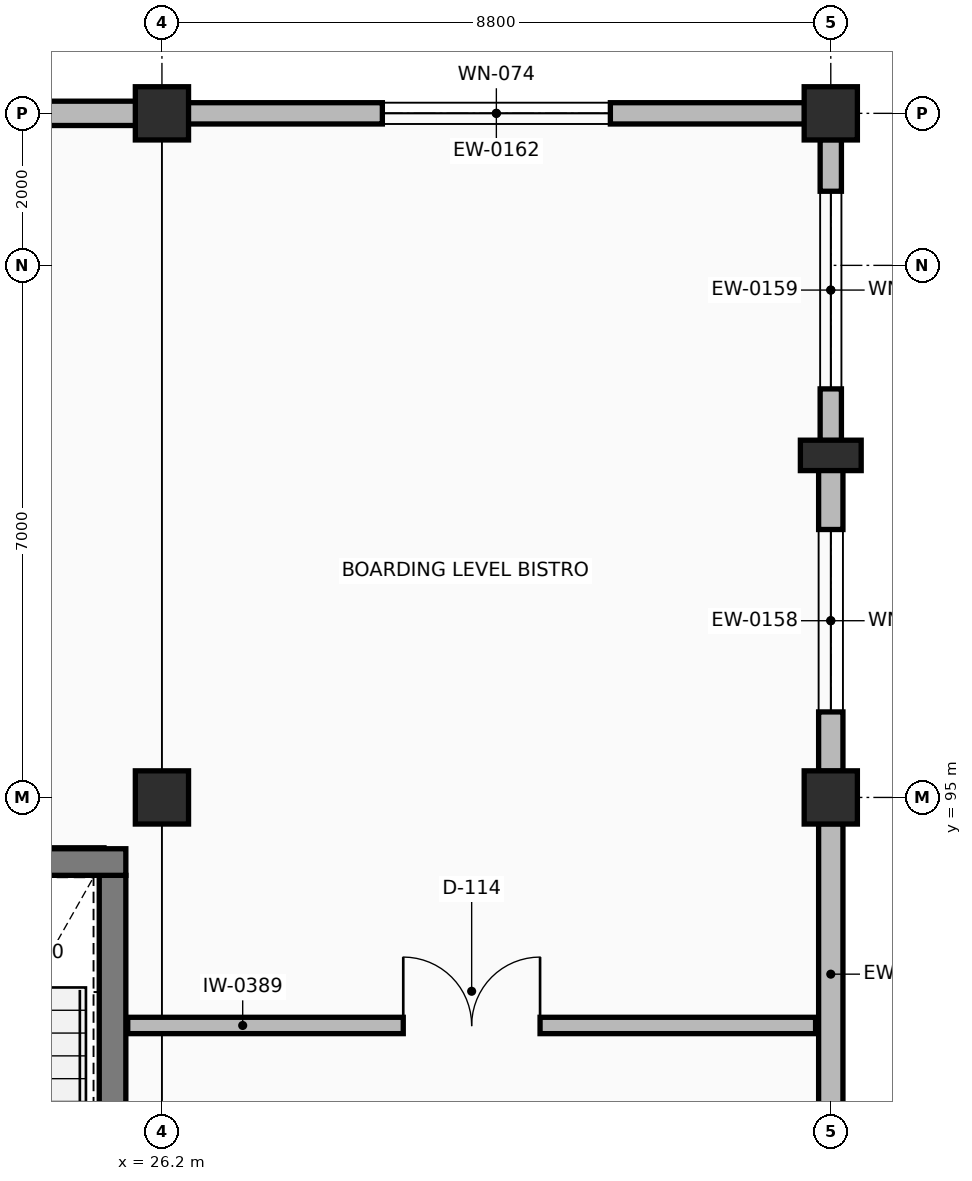
"""IFC4 building model, lengths in metres.
Left out: names, types, materials, properties, quantities, classifications, styles, units other than length and angle.
Written with IfcOpenShell. Run it as: python <this file> out.ifc"""

import sys

from ifc_helpers import new_model, si_unit, direction, frame, frame_2d, origin, origin_2d, place, context, subcontext, project, spatial, rectangle, extrude, element, fill, save


model = new_model("IFC4")
c1 = context("Model", 3, precision=1e-05, world=origin(), true_north=direction((0.0, 1.0)))
c2 = subcontext(c1, "Body", "Model", "MODEL_VIEW")
j1 = project(units=[si_unit("LENGTHUNIT", "METRE"), si_unit("PLANEANGLEUNIT", "RADIAN")], contexts=[c1])
p1 = place(None, origin())
s1 = spatial("IfcSite", under=j1, at=p1, CompositionType="ELEMENT")
p2 = place(p1, origin())
s2 = spatial("IfcBuilding", under=s1, at=p2, CompositionType="ELEMENT")
p3 = place(p2, frame((0.0, 0.0, 9.6)))
s3 = spatial("IfcBuildingStorey", under=s2, at=p3, CompositionType="ELEMENT", Elevation=9.6)
for number, where, z_axis, x_axis in (
    (1, (26.2, 95.0, 0.0), (0.0, 0.0, 1.0), (1.0, 0.0, 0.0)),
    (2, (26.2, 104.0, 0.0), (0.0, 0.0, 1.0), (1.0, 0.0, 0.0)),
    (3, (35.0, 95.0, 0.0), (0.0, 0.0, 1.0), (1.0, 0.0, 0.0)),
    (4, (35.0, 104.0, 0.0), (0.0, 0.0, 1.0), (1.0, 0.0, 0.0)),
):
    element("IfcColumn", number, at=place(p3, frame(where, z_axis=z_axis, x_axis=x_axis)), inside=s3, PredefinedType="COLUMN", context=c2, shape_type="SweptSolid", body=[
        extrude(rectangle(XDim=0.7, YDim=0.7, at=origin_2d()), origin(), (0.0, 0.0, 1.0), 4.8),
    ])
p4 = place(p3, frame((35.0, 99.5, 0.0), z_axis=(0.0, 0.0, 1.0), x_axis=(0.0, 1.0, 0.0)))
e5 = element("IfcColumn", 5, at=p4, inside=s3, PredefinedType="PILASTER", context=c2, shape_type="SweptSolid", body=[
    extrude(rectangle(XDim=0.4, YDim=0.8, at=origin_2d()), origin(), (0.0, 0.0, 1.0), 4.8),
])
p5 = place(p3, frame((35.0, 90.695, 0.0), z_axis=(0.0, 0.0, 1.0), x_axis=(0.0, 1.0, 0.0)))
e6 = element("IfcWall", 6, at=p5, inside=s3, PredefinedType="SOLIDWALL", context=c2, shape_type="SweptSolid", body=[
    extrude(rectangle(XDim=3.96, YDim=0.32, at=frame_2d((1.98, 0.0))), origin(), (0.0, 0.0, 1.0), 2.752),
])
p6 = place(p3, frame((35.0, 95.345, 0.0), z_axis=(0.0, 0.0, 1.0), x_axis=(0.0, 1.0, 0.0)))
e7 = element("IfcWall", 7, at=p6, inside=s3, PredefinedType="SOLIDWALL", context=c2, shape_type="SweptSolid", body=[
    extrude(rectangle(XDim=3.96, YDim=0.32, at=frame_2d((1.98, 0.0))), origin(), (0.0, 0.0, 1.0), 4.075),
])
p7 = place(p6, frame((0.78, 0.0, 0.9)))
e8 = element("IfcOpeningElement", 8, at=p7, cuts=e7, PredefinedType="OPENING", context=c2, shape_type="SweptSolid", body=[
    extrude(rectangle(XDim=2.4, YDim=1.55, at=frame_2d((1.2, 0.775))), frame((0.0, 0.17, 0.0), z_axis=(0.0, -1.0, 0.0), x_axis=(1.0, 0.0, 0.0)), (0.0, 0.0, 1.0), 0.34),
])
p8 = place(p3, frame((35.0, 99.695, 0.0), z_axis=(0.0, 0.0, 1.0), x_axis=(0.0, 1.0, 0.0)))
e9 = element("IfcWall", 9, at=p8, inside=s3, PredefinedType="SOLIDWALL", context=c2, shape_type="SweptSolid", body=[
    extrude(rectangle(XDim=3.96, YDim=0.28, at=frame_2d((1.98, 0.0))), origin(), (0.0, 0.0, 1.0), 4.075),
])
p9 = place(p8, frame((0.68, 0.0, 0.9)))
e10 = element("IfcOpeningElement", 10, at=p9, cuts=e9, PredefinedType="OPENING", context=c2, shape_type="SweptSolid", body=[
    extrude(rectangle(XDim=2.6, YDim=1.55, at=frame_2d((1.3, 0.775))), frame((0.0, 0.15, 0.0), z_axis=(0.0, -1.0, 0.0), x_axis=(1.0, 0.0, 0.0)), (0.0, 0.0, 1.0), 0.3),
])
p10 = place(p3, frame((25.855, 104.0, 0.0), z_axis=(0.0, 0.0, 1.0), x_axis=(-1.0, 0.0, 0.0)))
e11 = element("IfcWall", 11, at=p10, inside=s3, PredefinedType="SOLIDWALL", context=c2, shape_type="SweptSolid", body=[
    extrude(rectangle(XDim=8.31, YDim=0.32, at=frame_2d((4.155, 0.0))), origin(), (0.0, 0.0, 1.0), 3.614),
])
p11 = place(p3, frame((34.655, 104.0, 0.0), z_axis=(0.0, 0.0, 1.0), x_axis=(-1.0, 0.0, 0.0)))
e12 = element("IfcWall", 12, at=p11, inside=s3, PredefinedType="SOLIDWALL", context=c2, shape_type="SweptSolid", body=[
    extrude(rectangle(XDim=8.11, YDim=0.28, at=frame_2d((4.055, 0.0))), origin(), (0.0, 0.0, 1.0), 3.687),
])
p12 = place(p11, frame((2.555, 0.0, 0.9)))
e13 = element("IfcOpeningElement", 13, at=p12, cuts=e12, PredefinedType="OPENING", context=c2, shape_type="SweptSolid", body=[
    extrude(rectangle(XDim=3.0, YDim=1.55, at=frame_2d((1.5, 0.775))), frame((0.0, 0.15, 0.0), z_axis=(0.0, -1.0, 0.0), x_axis=(1.0, 0.0, 0.0)), (0.0, 0.0, 1.0), 0.3),
])
p13 = place(p3, frame((25.55, 86.425, 0.0), z_axis=(0.0, 0.0, 1.0), x_axis=(0.0, 1.0, 0.0)))
e14 = element("IfcWall", 14, at=p13, inside=s3, PredefinedType="SHEAR", context=c2, shape_type="SweptSolid", body=[
    extrude(rectangle(XDim=7.55, YDim=0.35, at=frame_2d((3.775, 0.0))), origin(), (0.0, 0.0, 1.0), 4.49),
])
p14 = place(p3, frame((25.725, 94.15, 0.0), z_axis=(0.0, 0.0, 1.0), x_axis=(-1.0, 0.0, 0.0)))
e15 = element("IfcWall", 15, at=p14, inside=s3, PredefinedType="SHEAR", context=c2, shape_type="SweptSolid", body=[
    extrude(rectangle(XDim=4.25, YDim=0.35, at=frame_2d((2.125, 0.0))), origin(), (0.0, 0.0, 1.0), 4.49),
])
p15 = place(p3, frame((25.75, 92.0, 0.0), z_axis=(0.0, 0.0, 1.0), x_axis=(1.0, 0.0, 0.0)))
e16 = element("IfcWall", 16, at=p15, inside=s3, PredefinedType="PARTITIONING", context=c2, shape_type="SweptSolid", body=[
    extrude(rectangle(XDim=9.05, YDim=0.215, at=frame_2d((4.525, 0.0))), origin(), (0.0, 0.0, 1.0), 3.677),
])
p16 = place(p15, frame((3.625, 0.0, 0.0)))
e17 = element("IfcOpeningElement", 17, at=p16, cuts=e16, PredefinedType="OPENING", context=c2, shape_type="SweptSolid", body=[
    extrude(rectangle(XDim=1.8, YDim=2.3, at=frame_2d((0.9, 1.15))), frame((0.0, 0.117, 0.0), z_axis=(0.0, -1.0, 0.0), x_axis=(1.0, 0.0, 0.0)), (0.0, 0.0, 1.0), 0.235),
])
p17 = place(p7, origin())
e18 = element("IfcWindow", 18, at=p17, inside=s3, PartitioningType="SINGLE_PANEL", PredefinedType="WINDOW", context=c2, shape_type="SweptSolid", body=[
    extrude(rectangle(XDim=2.4, YDim=1.55, at=frame_2d((1.2, 0.775))), frame((0.0, 0.03, 0.0), z_axis=(0.0, -1.0, 0.0), x_axis=(1.0, 0.0, 0.0)), (0.0, 0.0, 1.0), 0.06),
])
fill(e8, e18)
p18 = place(p9, origin())
e19 = element("IfcWindow", 19, at=p18, inside=s3, PartitioningType="SINGLE_PANEL", PredefinedType="WINDOW", context=c2, shape_type="SweptSolid", body=[
    extrude(rectangle(XDim=2.6, YDim=1.55, at=frame_2d((1.3, 0.775))), frame((0.0, 0.03, 0.0), z_axis=(0.0, -1.0, 0.0), x_axis=(1.0, 0.0, 0.0)), (0.0, 0.0, 1.0), 0.06),
])
fill(e10, e19)
p19 = place(p12, origin())
e20 = element("IfcWindow", 20, at=p19, inside=s3, PartitioningType="SINGLE_PANEL", PredefinedType="WINDOW", context=c2, shape_type="SweptSolid", body=[
    extrude(rectangle(XDim=3.0, YDim=1.55, at=frame_2d((1.5, 0.775))), frame((0.0, 0.03, 0.0), z_axis=(0.0, -1.0, 0.0), x_axis=(1.0, 0.0, 0.0)), (0.0, 0.0, 1.0), 0.06),
])
fill(e13, e20)
p20 = place(p16, origin())
e21 = element("IfcDoor", 21, at=p20, inside=s3, OperationType="DOUBLE_SWING_LEFT", PredefinedType="DOOR", context=c2, shape_type="SweptSolid", body=[
    extrude(rectangle(XDim=1.8, YDim=2.3, at=frame_2d((0.9, 1.15))), frame((0.0, 0.025, 0.0), z_axis=(0.0, -1.0, 0.0), x_axis=(1.0, 0.0, 0.0)), (0.0, 0.0, 1.0), 0.05),
])
fill(e17, e21)
save(model, sys.argv[1])
